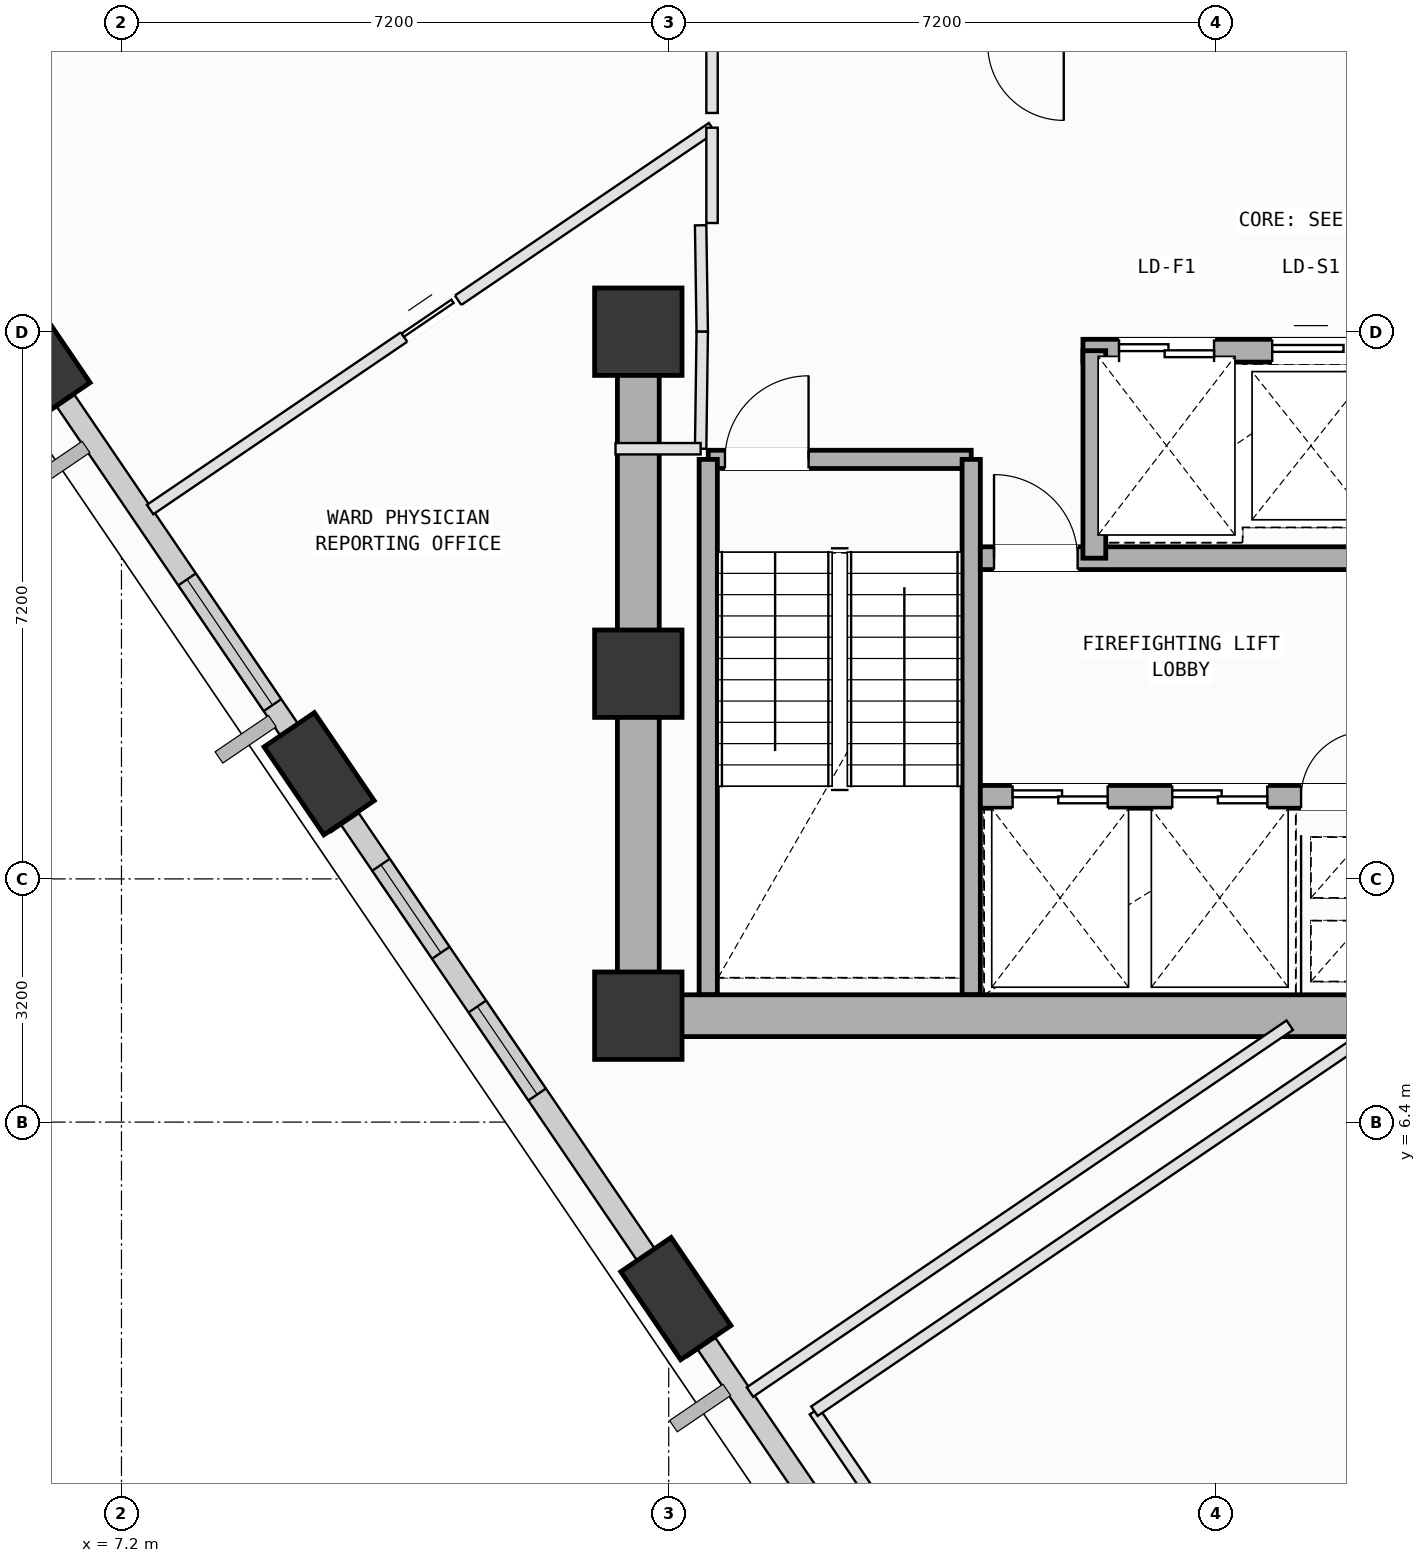
"""IFC4 building model, lengths in metres.
Left out: names, types, materials, properties, quantities, classifications, styles, units other than length and angle.
Written with IfcOpenShell. Run it as: python <this file> out.ifc"""

import sys

from ifc_helpers import new_model, si_unit, direction, frame, frame_2d, origin, origin_2d, place, context, subcontext, project, spatial, rectangle, extrude, element, fill, save


model = new_model("IFC4")
c1 = context("Model", 3, precision=1e-05, world=origin(), true_north=direction((0.0, 1.0)))
c2 = subcontext(c1, "Body", "Model", "MODEL_VIEW")
j1 = project(units=[si_unit("LENGTHUNIT", "METRE"), si_unit("PLANEANGLEUNIT", "RADIAN")], contexts=[c1])
p1 = place(None, origin())
s1 = spatial("IfcSite", under=j1, at=p1, CompositionType="ELEMENT")
p2 = place(p1, origin())
s2 = spatial("IfcBuilding", under=s1, at=p2, CompositionType="ELEMENT")
p3 = place(p2, frame((0.0, 0.0, 169.8)))
s3 = spatial("IfcBuildingStorey", under=s2, at=p3, CompositionType="ELEMENT", Elevation=169.8)
for number, where, z_axis, x_axis in (
    (1, (14.0, 7.8, 0.0), (0.0, 0.0, 1.0), (1.0, 0.0, 0.0)),
    (2, (14.0, 12.3, 0.0), (0.0, 0.0, 1.0), (1.0, 0.0, 0.0)),
    (3, (14.0, 16.8, 0.0), (0.0, 0.0, 1.0), (1.0, 0.0, 0.0)),
):
    element("IfcColumn", number, at=place(p3, frame(where, z_axis=z_axis, x_axis=x_axis)), inside=s3, PredefinedType="COLUMN", context=c2, shape_type="SweptSolid", body=[
        extrude(rectangle(XDim=1.15, YDim=1.15, at=origin_2d()), origin(), (0.0, 0.0, 1.0), 4.0),
    ])
p4 = place(p3, frame((6.063, 16.483, 0.002), z_axis=(0.035183752293, -0.113012638829, 0.992970415994), x_axis=(-0.780800746343, 0.617062923055, 0.097895574472)))
e4 = element("IfcColumn", 4, at=p4, inside=s3, PredefinedType="COLUMN", context=c2, shape_type="SweptSolid", body=[
    extrude(rectangle(XDim=1.4, YDim=0.8, at=origin_2d()), origin(), (0.0, 0.0, 1.0), 4.025),
])
p5 = place(p3, frame((9.801, 10.983, 0.002), z_axis=(0.057662755766, -0.097541103701, 0.993559630665), x_axis=(-0.902042281656, 0.421351241208, 0.093716880212)))
e5 = element("IfcColumn", 5, at=p5, inside=s3, PredefinedType="COLUMN", context=c2, shape_type="SweptSolid", body=[
    extrude(rectangle(XDim=1.4, YDim=0.8, at=origin_2d()), origin(), (0.0, 0.0, 1.0), 4.022),
])
p6 = place(p3, frame((14.494, 4.077, 0.002), z_axis=(0.085980971728, -0.077971452838, 0.99324102062), x_axis=(-0.986119314083, 0.1354725925, 0.095999349344)))
e6 = element("IfcColumn", 6, at=p6, inside=s3, PredefinedType="COLUMN", context=c2, shape_type="SweptSolid", body=[
    extrude(rectangle(XDim=1.4, YDim=0.8, at=origin_2d()), origin(), (0.0, 0.0, 1.0), 4.023),
])
p7 = place(p3, frame((9.65, 11.206, 0.0), z_axis=(0.0, 0.0, 1.0), x_axis=(-0.562110697088, 0.827062007482, 0.0)))
e7 = element("IfcWall", 7, at=p7, inside=s3, PredefinedType="SOLIDWALL", context=c2, shape_type="SweptSolid", body=[
    extrude(rectangle(XDim=5.662, YDim=0.28, at=frame_2d((2.831, 0.0))), origin(), (0.0, 0.0, 1.0), 3.165),
])
p8 = place(p7, frame((0.823, 0.0, 0.75)))
e8 = element("IfcOpeningElement", 8, at=p8, cuts=e7, PredefinedType="OPENING", context=c2, shape_type="SweptSolid", body=[
    extrude(rectangle(XDim=2.0, YDim=1.95, at=frame_2d((1.0, 0.975))), frame((0.0, 0.15, 0.0), z_axis=(0.0, -1.0, 0.0), x_axis=(1.0, 0.0, 0.0)), (0.0, 0.0, 1.0), 0.3),
])
p9 = place(p3, frame((14.344, 4.298, 0.0), z_axis=(0.0, 0.0, 1.0), x_axis=(-0.562080452942, 0.827082562034, 0.0)))
e9 = element("IfcWall", 9, at=p9, inside=s3, PredefinedType="SOLIDWALL", context=c2, shape_type="SweptSolid", body=[
    extrude(rectangle(XDim=7.36, YDim=0.28, at=frame_2d((3.68, 0.0))), origin(), (0.0, 0.0, 1.0), 3.165),
])
p10 = place(p9, frame((2.981, 0.0, 0.75)))
e10 = element("IfcOpeningElement", 10, at=p10, cuts=e9, PredefinedType="OPENING", context=c2, shape_type="SweptSolid", body=[
    extrude(rectangle(XDim=1.4, YDim=1.85, at=frame_2d((0.7, 0.925))), frame((0.0, 0.15, 0.0), z_axis=(0.0, -1.0, 0.0), x_axis=(1.0, 0.0, 0.0)), (0.0, 0.0, 1.0), 0.3),
])
p11 = place(p9, frame((5.236, 0.0, 0.75)))
e11 = element("IfcOpeningElement", 11, at=p11, cuts=e9, PredefinedType="OPENING", context=c2, shape_type="SweptSolid", body=[
    extrude(rectangle(XDim=1.4, YDim=1.85, at=frame_2d((0.7, 0.925))), frame((0.0, 0.15, 0.0), z_axis=(0.0, -1.0, 0.0), x_axis=(1.0, 0.0, 0.0)), (0.0, 0.0, 1.0), 0.3),
])
p12 = place(p3, frame((18.397, -1.666, 0.0), z_axis=(0.0, 0.0, 1.0), x_axis=(-0.562110427099, 0.827062190979, 0.0)))
e12 = element("IfcWall", 12, at=p12, inside=s3, PredefinedType="SOLIDWALL", context=c2, shape_type="SweptSolid", body=[
    extrude(rectangle(XDim=6.223, YDim=0.28, at=frame_2d((3.112, 0.0))), origin(), (0.0, 0.0, 1.0), 3.165),
])
p13 = place(p12, frame((1.688, 0.0, 0.75)))
e13 = element("IfcOpeningElement", 13, at=p13, cuts=e12, PredefinedType="OPENING", context=c2, shape_type="SweptSolid", body=[
    extrude(rectangle(XDim=1.8, YDim=2.05, at=frame_2d((0.9, 1.025))), frame((0.0, 0.15, 0.0), z_axis=(0.0, -1.0, 0.0), x_axis=(1.0, 0.0, 0.0)), (0.0, 0.0, 1.0), 0.3),
])
p14 = place(p3, frame((14.92, 15.12, 0.0), z_axis=(0.0, 0.0, 1.0), x_axis=(1.0, 0.0, 0.0)))
e14 = element("IfcWall", 14, at=p14, inside=s3, PredefinedType="SOLIDWALL", context=c2, shape_type="SweptSolid", body=[
    extrude(rectangle(XDim=3.46, YDim=0.24, at=frame_2d((1.73, 0.0))), origin(), (0.0, 0.0, 1.0), 3.78),
])
p15 = place(p14, frame((0.22, 0.0, 0.0)))
e15 = element("IfcOpeningElement", 15, at=p15, cuts=e14, PredefinedType="OPENING", context=c2, shape_type="SweptSolid", body=[
    extrude(rectangle(XDim=1.1, YDim=2.15, at=frame_2d((0.55, 1.075))), frame((0.0, 0.13, 0.0), z_axis=(0.0, -1.0, 0.0), x_axis=(1.0, 0.0, 0.0)), (0.0, 0.0, 1.0), 0.26),
])
for number, where, z_axis, x_axis in (
    (16, (18.38, 15.12, 0.0), (0.0, 0.0, 1.0), (0.0, -1.0, 0.0)),
    (17, (14.92, 8.075, 0.0), (0.0, 0.0, 1.0), (0.0, 1.0, 0.0)),
):
    element("IfcWall", number, at=place(p3, frame(where, z_axis=z_axis, x_axis=x_axis)), inside=s3, PredefinedType="SOLIDWALL", context=c2, shape_type="SweptSolid", body=[
        extrude(rectangle(XDim=7.045, YDim=0.24, at=frame_2d((3.522, 0.0))), origin(), (0.0, 0.0, 1.0), 3.78),
    ])
p16 = place(p3, frame((14.0, 7.8, 0.0), z_axis=(0.0, 0.0, 1.0), x_axis=(1.0, 0.0, 0.0)))
e18 = element("IfcWall", 18, at=p16, inside=s3, PredefinedType="SHEAR", context=c2, shape_type="SweptSolid", body=[
    extrude(rectangle(XDim=10.8, YDim=0.55, at=frame_2d((5.4, 0.0))), origin(), (0.0, 0.0, 1.0), 3.78),
])
p17 = place(p3, frame((14.0, 16.8, 0.0), z_axis=(0.0, 0.0, 1.0), x_axis=(0.0, -1.0, 0.0)))
e19 = element("IfcWall", 19, at=p17, inside=s3, PredefinedType="SHEAR", context=c2, shape_type="SweptSolid", body=[
    extrude(rectangle(XDim=9.0, YDim=0.55, at=frame_2d((4.5, 0.0))), origin(), (0.0, 0.0, 1.0), 3.78),
])
p18 = place(p3, frame((19.85, 16.55, 0.0), z_axis=(0.0, 0.0, 1.0), x_axis=(1.0, 0.0, 0.0)))
e20 = element("IfcWall", 20, at=p18, inside=s3, PredefinedType="SOLIDWALL", context=c2, shape_type="SweptSolid", body=[
    extrude(rectangle(XDim=4.375, YDim=0.3, at=frame_2d((2.188, 0.0))), origin(), (0.0, 0.0, 1.0), 3.78),
])
p19 = place(p18, frame((0.475, 0.0, 0.0)))
e21 = element("IfcOpeningElement", 21, at=p19, cuts=e20, PredefinedType="OPENING", context=c2, shape_type="SweptSolid", body=[
    extrude(rectangle(XDim=1.25, YDim=2.18, at=frame_2d((0.625, 1.09))), frame((0.0, 0.16, 0.0), z_axis=(0.0, -1.0, 0.0), x_axis=(1.0, 0.0, 0.0)), (0.0, 0.0, 1.0), 0.32),
])
p20 = place(p18, frame((2.49, 0.0, 0.0)))
e22 = element("IfcOpeningElement", 22, at=p20, cuts=e20, PredefinedType="OPENING", context=c2, shape_type="SweptSolid", body=[
    extrude(rectangle(XDim=1.02, YDim=2.12, at=frame_2d((0.51, 1.06))), frame((0.0, 0.16, 0.0), z_axis=(0.0, -1.0, 0.0), x_axis=(1.0, 0.0, 0.0)), (0.0, 0.0, 1.0), 0.32),
])
p21 = place(p3, frame((18.5, 10.68, 0.0), z_axis=(0.0, 0.0, 1.0), x_axis=(1.0, 0.0, 0.0)))
e23 = element("IfcWall", 23, at=p21, inside=s3, PredefinedType="SOLIDWALL", context=c2, shape_type="SweptSolid", body=[
    extrude(rectangle(XDim=5.3, YDim=0.3, at=frame_2d((2.65, 0.0))), origin(), (0.0, 0.0, 1.0), 3.78),
])
p22 = place(p21, frame((4.22, 0.0, 0.0)))
e24 = element("IfcOpeningElement", 24, at=p22, cuts=e23, PredefinedType="OPENING", context=c2, shape_type="SweptSolid", body=[
    extrude(rectangle(XDim=0.86, YDim=2.06, at=frame_2d((0.43, 1.03))), frame((0.0, 0.16, 0.0), z_axis=(0.0, -1.0, 0.0), x_axis=(1.0, 0.0, 0.0)), (0.0, 0.0, 1.0), 0.32),
])
p23 = place(p21, frame((0.425, 0.0, 0.0)))
e25 = element("IfcOpeningElement", 25, at=p23, cuts=e23, PredefinedType="OPENING", context=c2, shape_type="SweptSolid", body=[
    extrude(rectangle(XDim=1.25, YDim=2.18, at=frame_2d((0.625, 1.09))), frame((0.0, 0.16, 0.0), z_axis=(0.0, -1.0, 0.0), x_axis=(1.0, 0.0, 0.0)), (0.0, 0.0, 1.0), 0.32),
])
p24 = place(p21, frame((2.525, 0.0, 0.0)))
e26 = element("IfcOpeningElement", 26, at=p24, cuts=e23, PredefinedType="OPENING", context=c2, shape_type="SweptSolid", body=[
    extrude(rectangle(XDim=1.25, YDim=2.18, at=frame_2d((0.625, 1.09))), frame((0.0, 0.16, 0.0), z_axis=(0.0, -1.0, 0.0), x_axis=(1.0, 0.0, 0.0)), (0.0, 0.0, 1.0), 0.32),
])
p25 = place(p3, frame((18.5, 13.82, 0.0), z_axis=(0.0, 0.0, 1.0), x_axis=(1.0, 0.0, 0.0)))
e27 = element("IfcWall", 27, at=p25, inside=s3, PredefinedType="SOLIDWALL", context=c2, shape_type="SweptSolid", body=[
    extrude(rectangle(XDim=5.3, YDim=0.3, at=frame_2d((2.65, 0.0))), origin(), (0.0, 0.0, 1.0), 3.78),
])
p26 = place(p25, frame((0.18, 0.0, 0.0)))
e28 = element("IfcOpeningElement", 28, at=p26, cuts=e27, PredefinedType="OPENING", context=c2, shape_type="SweptSolid", body=[
    extrude(rectangle(XDim=1.1, YDim=2.15, at=frame_2d((0.55, 1.075))), frame((0.0, 0.16, 0.0), z_axis=(0.0, -1.0, 0.0), x_axis=(1.0, 0.0, 0.0)), (0.0, 0.0, 1.0), 0.32),
])
p27 = place(p3, frame((20.0, 13.82, 0.0), z_axis=(0.0, 0.0, 1.0), x_axis=(0.0, 1.0, 0.0)))
e29 = element("IfcWall", 29, at=p27, inside=s3, PredefinedType="SOLIDWALL", context=c2, shape_type="SweptSolid", body=[
    extrude(rectangle(XDim=2.73, YDim=0.3, at=frame_2d((1.365, 0.0))), origin(), (0.0, 0.0, 1.0), 3.78),
])
p28 = place(p3, frame((22.535, -6.553, 0.0), z_axis=(0.0, 0.0, 1.0), x_axis=(-0.562108981363, 0.827063173567, 0.0)))
e30 = element("IfcWall", 30, at=p28, inside=s3, PredefinedType="PARTITIONING", context=c2, shape_type="SweptSolid", body=[
    extrude(rectangle(XDim=11.062, YDim=0.15, at=frame_2d((5.531, 0.0))), origin(), (0.0, 0.0, 1.0), 3.165),
])
p29 = place(p3, frame((16.317, 2.596, 0.0), z_axis=(0.0, 0.0, 1.0), x_axis=(0.82709631039, 0.562060222165, 0.0)))
e31 = element("IfcWall", 31, at=p29, inside=s3, PredefinedType="PARTITIONING", context=c2, shape_type="SweptSolid", body=[
    extrude(rectangle(XDim=9.037, YDim=0.15, at=frame_2d((4.518, 0.0))), origin(), (0.0, 0.0, 1.0), 3.78),
])
p30 = place(p3, frame((14.82, 18.2, 0.0), z_axis=(0.0, 0.0, 1.0), x_axis=(0.01499656939, -0.99988754513, 0.0)))
e32 = element("IfcWall", 32, at=p30, inside=s3, PredefinedType="PARTITIONING", context=c2, shape_type="SweptSolid", body=[
    extrude(rectangle(XDim=1.4, YDim=0.15, at=frame_2d((0.7, 0.0))), origin(), (0.0, 0.0, 1.0), 3.78),
])
p31 = place(p3, frame((14.841, 16.8, 0.0), z_axis=(0.0, 0.0, 1.0), x_axis=(-0.01363221443, -0.999907077048, 0.0)))
e33 = element("IfcWall", 33, at=p31, inside=s3, PredefinedType="PARTITIONING", context=c2, shape_type="SweptSolid", body=[
    extrude(rectangle(XDim=1.54, YDim=0.15, at=frame_2d((0.77, 0.0))), origin(), (0.0, 0.0, 1.0), 3.78),
])
p32 = place(p3, frame((14.82, 15.26, 0.0), z_axis=(0.0, 0.0, 1.0), x_axis=(-1.0, 0.0, 0.0)))
e34 = element("IfcWall", 34, at=p32, inside=s3, PredefinedType="PARTITIONING", context=c2, shape_type="SweptSolid", body=[
    extrude(rectangle(XDim=1.12, YDim=0.15, at=frame_2d((0.56, 0.0))), origin(), (0.0, 0.0, 1.0), 3.78),
])
p33 = place(p3, frame((22.571, 7.675, 0.0), z_axis=(0.0, 0.0, 1.0), x_axis=(-0.827048106259, -0.562131150119, 0.0)))
e35 = element("IfcWall", 35, at=p33, inside=s3, PredefinedType="PARTITIONING", context=c2, shape_type="SweptSolid", body=[
    extrude(rectangle(XDim=8.587, YDim=0.15, at=frame_2d((4.293, 0.0))), origin(), (0.0, 0.0, 1.0), 3.78),
])
p34 = place(p3, frame((14.708, 3.352, 0.0), z_axis=(0.0, 0.0, 1.0), x_axis=(-0.561707230163, 0.82733607898, 0.0)))
e36 = element("IfcWall", 36, at=p34, inside=s3, PredefinedType="PARTITIONING", context=c2, shape_type="SweptSolid", body=[
    extrude(rectangle(XDim=0.986, YDim=0.15, at=frame_2d((0.493, 0.0))), origin(), (0.0, 0.0, 1.0), 3.165),
])
p35 = place(p3, frame((10.017, 10.256, 0.0), z_axis=(0.0, 0.0, 1.0), x_axis=(-0.562067465181, 0.827091388291, 0.0)))
e37 = element("IfcWall", 37, at=p35, inside=s3, PredefinedType="PARTITIONING", context=c2, shape_type="SweptSolid", body=[
    extrude(rectangle(XDim=0.991, YDim=0.15, at=frame_2d((0.496, 0.0))), origin(), (0.0, 0.0, 1.0), 3.165),
])
p36 = place(p3, frame((7.577, 14.46, 0.0), z_axis=(0.0, 0.0, 1.0), x_axis=(0.827101219413, 0.562052998253, 0.0)))
e38 = element("IfcWall", 38, at=p36, inside=s3, PredefinedType="PARTITIONING", context=c2, shape_type="SweptSolid", body=[
    extrude(rectangle(XDim=8.938, YDim=0.15, at=frame_2d((4.469, 0.0))), origin(), (0.0, 0.0, 1.0), 3.78),
])
p37 = place(p36, frame((4.039, 0.0, 0.0)))
e39 = element("IfcOpeningElement", 39, at=p37, cuts=e38, PredefinedType="OPENING", context=c2, shape_type="SweptSolid", body=[
    extrude(rectangle(XDim=0.86, YDim=2.06, at=frame_2d((0.43, 1.03))), frame((0.0, 0.085, 0.0), z_axis=(0.0, -1.0, 0.0), x_axis=(1.0, 0.0, 0.0)), (0.0, 0.0, 1.0), 0.17),
])
p38 = place(p3, frame((14.97, 19.484, 0.0), z_axis=(0.0, 0.0, 1.0), x_axis=(0.0, -1.0, 0.0)))
e40 = element("IfcWall", 40, at=p38, inside=s3, PredefinedType="PARTITIONING", context=c2, shape_type="SweptSolid", body=[
    extrude(rectangle(XDim=1.254, YDim=0.15, at=frame_2d((0.627, 0.0))), origin(), (0.0, 0.0, 1.0), 3.78),
])
p39 = place(p3, frame((14.97, 20.55, 0.0), z_axis=(0.0, 0.0, 1.0), x_axis=(0.0, -1.0, 0.0)))
e41 = element("IfcWall", 41, at=p39, inside=s3, PredefinedType="PARTITIONING", context=c2, shape_type="SweptSolid", body=[
    extrude(rectangle(XDim=0.872, YDim=0.15, at=frame_2d((0.436, 0.0))), origin(), (0.0, 0.0, 1.0), 3.78),
])
p40 = place(p3, frame((6.277, 15.759, 0.0), z_axis=(0.0, 0.0, 1.0), x_axis=(-0.561732265125, 0.827319081321, 0.0)))
e42 = element("IfcWall", 42, at=p40, inside=s3, PredefinedType="PARTITIONING", context=c2, shape_type="SweptSolid", body=[
    extrude(rectangle(XDim=0.983, YDim=0.15, at=frame_2d((0.491, 0.0))), origin(), (0.0, 0.0, 1.0), 3.165),
])
p41 = place(p8, origin())
e43 = element("IfcWindow", 43, at=p41, inside=s3, PartitioningType="SINGLE_PANEL", PredefinedType="WINDOW", context=c2, shape_type="SweptSolid", body=[
    extrude(rectangle(XDim=2.0, YDim=1.95, at=frame_2d((1.0, 0.975))), frame((0.0, 0.03, 0.0), z_axis=(0.0, -1.0, 0.0), x_axis=(1.0, 0.0, 0.0)), (0.0, 0.0, 1.0), 0.06),
])
fill(e8, e43)
p42 = place(p10, origin())
e44 = element("IfcWindow", 44, at=p42, inside=s3, PartitioningType="SINGLE_PANEL", PredefinedType="WINDOW", context=c2, shape_type="SweptSolid", body=[
    extrude(rectangle(XDim=1.4, YDim=1.85, at=frame_2d((0.7, 0.925))), frame((0.0, 0.03, 0.0), z_axis=(0.0, -1.0, 0.0), x_axis=(1.0, 0.0, 0.0)), (0.0, 0.0, 1.0), 0.06),
])
fill(e10, e44)
p43 = place(p11, origin())
e45 = element("IfcWindow", 45, at=p43, inside=s3, PartitioningType="SINGLE_PANEL", PredefinedType="WINDOW", context=c2, shape_type="SweptSolid", body=[
    extrude(rectangle(XDim=1.4, YDim=1.85, at=frame_2d((0.7, 0.925))), frame((0.0, 0.03, 0.0), z_axis=(0.0, -1.0, 0.0), x_axis=(1.0, 0.0, 0.0)), (0.0, 0.0, 1.0), 0.06),
])
fill(e11, e45)
p44 = place(p15, origin())
e46 = element("IfcDoor", 46, at=p44, inside=s3, OperationType="SINGLE_SWING_RIGHT", PredefinedType="DOOR", context=c2, shape_type="SweptSolid", body=[
    extrude(rectangle(XDim=1.1, YDim=2.15, at=frame_2d((0.55, 1.075))), frame((0.0, 0.025, 0.0), z_axis=(0.0, -1.0, 0.0), x_axis=(1.0, 0.0, 0.0)), (0.0, 0.0, 1.0), 0.05),
])
fill(e15, e46)
p45 = place(p22, origin())
e47 = element("IfcDoor", 47, at=p45, inside=s3, OperationType="SINGLE_SWING_RIGHT", PredefinedType="DOOR", context=c2, shape_type="SweptSolid", body=[
    extrude(rectangle(XDim=0.86, YDim=2.06, at=frame_2d((0.43, 1.03))), frame((0.0, 0.025, 0.0), z_axis=(0.0, -1.0, 0.0), x_axis=(1.0, 0.0, 0.0)), (0.0, 0.0, 1.0), 0.05),
])
fill(e24, e47)
p46 = place(p26, origin())
e48 = element("IfcDoor", 48, at=p46, inside=s3, OperationType="SINGLE_SWING_LEFT", PredefinedType="DOOR", context=c2, shape_type="SweptSolid", body=[
    extrude(rectangle(XDim=1.1, YDim=2.15, at=frame_2d((0.55, 1.075))), frame((0.0, 0.025, 0.0), z_axis=(0.0, -1.0, 0.0), x_axis=(1.0, 0.0, 0.0)), (0.0, 0.0, 1.0), 0.05),
])
fill(e28, e48)
p47 = place(p23, origin())
e49 = element("IfcDoor", 49, at=p47, inside=s3, OperationType="DOUBLE_DOOR_SLIDING", PredefinedType="DOOR", context=c2, shape_type="SweptSolid", body=[
    extrude(rectangle(XDim=1.25, YDim=2.18, at=frame_2d((0.625, 1.09))), frame((0.0, 0.025, 0.0), z_axis=(0.0, -1.0, 0.0), x_axis=(1.0, 0.0, 0.0)), (0.0, 0.0, 1.0), 0.05),
])
fill(e25, e49)
p48 = place(p24, origin())
e50 = element("IfcDoor", 50, at=p48, inside=s3, OperationType="DOUBLE_DOOR_SLIDING", PredefinedType="DOOR", context=c2, shape_type="SweptSolid", body=[
    extrude(rectangle(XDim=1.25, YDim=2.18, at=frame_2d((0.625, 1.09))), frame((0.0, 0.025, 0.0), z_axis=(0.0, -1.0, 0.0), x_axis=(1.0, 0.0, 0.0)), (0.0, 0.0, 1.0), 0.05),
])
fill(e26, e50)
p49 = place(p19, origin())
e51 = element("IfcDoor", 51, at=p49, inside=s3, OperationType="DOUBLE_DOOR_SLIDING", PredefinedType="DOOR", context=c2, shape_type="SweptSolid", body=[
    extrude(rectangle(XDim=1.25, YDim=2.18, at=frame_2d((0.625, 1.09))), frame((0.0, 0.025, 0.0), z_axis=(0.0, -1.0, 0.0), x_axis=(1.0, 0.0, 0.0)), (0.0, 0.0, 1.0), 0.05),
])
fill(e21, e51)
p50 = place(p20, origin())
e52 = element("IfcDoor", 52, at=p50, inside=s3, OperationType="SLIDING_TO_LEFT", PredefinedType="DOOR", context=c2, shape_type="SweptSolid", body=[
    extrude(rectangle(XDim=1.02, YDim=2.12, at=frame_2d((0.51, 1.06))), frame((0.0, 0.025, 0.0), z_axis=(0.0, -1.0, 0.0), x_axis=(1.0, 0.0, 0.0)), (0.0, 0.0, 1.0), 0.05),
])
fill(e22, e52)
p51 = place(p37, origin())
e53 = element("IfcDoor", 53, at=p51, inside=s3, OperationType="SLIDING_TO_LEFT", PredefinedType="DOOR", context=c2, shape_type="SweptSolid", body=[
    extrude(rectangle(XDim=0.86, YDim=2.06, at=frame_2d((0.43, 1.03))), frame((0.0, 0.025, 0.0), z_axis=(0.0, -1.0, 0.0), x_axis=(1.0, 0.0, 0.0)), (0.0, 0.0, 1.0), 0.05),
])
fill(e39, e53)
save(model, sys.argv[1])
